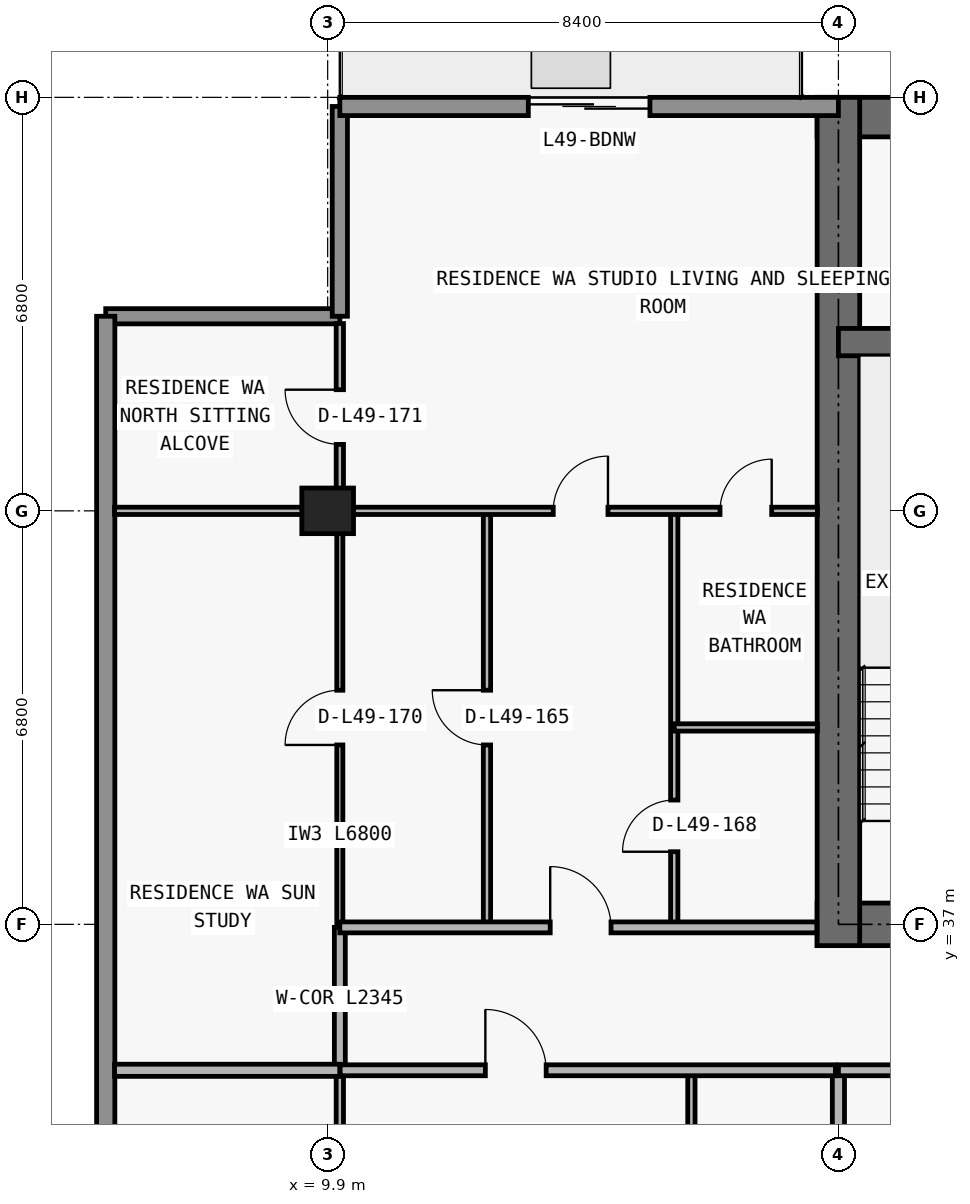
"""IFC4 building model, lengths in metres.
Left out: names, types, materials, properties, quantities, classifications, styles, units other than length and angle.
Written with IfcOpenShell. Run it as: python <this file> out.ifc"""

import sys

from ifc_helpers import new_model, si_unit, direction, frame, frame_2d, origin, origin_2d, place, context, subcontext, project, spatial, rectangle, extrude, element, fill, save


model = new_model("IFC4")
c1 = context("Model", 3, precision=1e-05, world=origin(), true_north=direction((0.0, 1.0)))
c2 = subcontext(c1, "Body", "Model", "MODEL_VIEW")
j1 = project(units=[si_unit("LENGTHUNIT", "METRE"), si_unit("PLANEANGLEUNIT", "RADIAN")], contexts=[c1])
p1 = place(None, origin())
s1 = spatial("IfcSite", under=j1, at=p1, CompositionType="ELEMENT")
p2 = place(p1, origin())
s2 = spatial("IfcBuilding", under=s1, at=p2, CompositionType="ELEMENT")
p3 = place(p2, frame((0.0, 0.0, 177.0)))
s3 = spatial("IfcBuildingStorey", under=s2, at=p3, CompositionType="ELEMENT", Elevation=177.0)
p4 = place(p3, frame((9.9, 43.8, 0.0), z_axis=(0.0, 0.0, 1.0), x_axis=(1.0, 0.0, 0.0)))
e1 = element("IfcColumn", 1, at=p4, inside=s3, PredefinedType="COLUMN", context=c2, shape_type="SweptSolid", body=[
    extrude(rectangle(XDim=0.85, YDim=0.75, at=origin_2d()), origin(), (0.0, 0.0, 1.0), 3.05),
])
p5 = place(p3, frame((17.95, 37.0, 0.0), z_axis=(0.0, 0.0, 1.0), x_axis=(1.0, 0.0, 0.0)))
e2 = element("IfcWall", 2, at=p5, inside=s3, PredefinedType="SHEAR", context=c2, shape_type="SweptSolid", body=[
    extrude(rectangle(XDim=41.9, YDim=0.7, at=frame_2d((20.95, 0.0))), origin(), (0.0, 0.0, 1.0), 3.05),
])
p6 = place(p5, frame((14.35, 0.0, 0.0)))
e3 = element("IfcOpeningElement", 3, at=p6, cuts=e2, PredefinedType="OPENING", context=c2, shape_type="SweptSolid", body=[
    extrude(rectangle(XDim=1.1, YDim=2.15, at=frame_2d((0.55, 1.075))), frame((0.0, 0.36, 0.0), z_axis=(0.0, -1.0, 0.0), x_axis=(1.0, 0.0, 0.0)), (0.0, 0.0, 1.0), 0.72),
])
p7 = place(p5, frame((6.2, 0.0, 0.0)))
e4 = element("IfcOpeningElement", 4, at=p7, cuts=e2, PredefinedType="OPENING", context=c2, shape_type="SweptSolid", body=[
    extrude(rectangle(XDim=1.05, YDim=2.15, at=frame_2d((0.525, 1.075))), frame((0.0, 0.36, 0.0), z_axis=(0.0, -1.0, 0.0), x_axis=(1.0, 0.0, 0.0)), (0.0, 0.0, 1.0), 0.72),
])
p8 = place(p5, frame((34.7, 0.0, 0.0)))
e5 = element("IfcOpeningElement", 5, at=p8, cuts=e2, PredefinedType="OPENING", context=c2, shape_type="SweptSolid", body=[
    extrude(rectangle(XDim=1.05, YDim=2.15, at=frame_2d((0.525, 1.075))), frame((0.0, 0.36, 0.0), z_axis=(0.0, -1.0, 0.0), x_axis=(1.0, 0.0, 0.0)), (0.0, 0.0, 1.0), 0.72),
])
p9 = place(p5, frame((10.812, 0.0, 0.0)))
e6 = element("IfcOpeningElement", 6, at=p9, cuts=e2, PredefinedType="OPENING", context=c2, shape_type="SweptSolid", body=[
    extrude(rectangle(XDim=1.05, YDim=2.15, at=frame_2d((0.525, 1.075))), frame((0.0, 0.36, 0.0), z_axis=(0.0, -1.0, 0.0), x_axis=(1.0, 0.0, 0.0)), (0.0, 0.0, 1.0), 0.72),
])
p10 = place(p5, frame((24.05, 0.0, 0.0)))
e7 = element("IfcOpeningElement", 7, at=p10, cuts=e2, PredefinedType="OPENING", context=c2, shape_type="SweptSolid", body=[
    extrude(rectangle(XDim=1.05, YDim=2.15, at=frame_2d((0.525, 1.075))), frame((0.0, 0.36, 0.0), z_axis=(0.0, -1.0, 0.0), x_axis=(1.0, 0.0, 0.0)), (0.0, 0.0, 1.0), 0.72),
])
p11 = place(p3, frame((17.95, 50.275, 0.0), z_axis=(0.0, 0.0, 1.0), x_axis=(1.0, 0.0, 0.0)))
e8 = element("IfcWall", 8, at=p11, inside=s3, PredefinedType="SHEAR", context=c2, shape_type="SweptSolid", body=[
    extrude(rectangle(XDim=41.9, YDim=0.65, at=frame_2d((20.95, 0.0))), origin(), (0.0, 0.0, 1.0), 3.05),
])
p12 = place(p3, frame((18.3, 36.65, 0.0), z_axis=(0.0, 0.0, 1.0), x_axis=(0.0, 1.0, 0.0)))
e9 = element("IfcWall", 9, at=p12, inside=s3, PredefinedType="SHEAR", context=c2, shape_type="SweptSolid", body=[
    extrude(rectangle(XDim=13.95, YDim=0.7, at=frame_2d((6.975, 0.0))), origin(), (0.0, 0.0, 1.0), 3.05),
])
p13 = place(p3, frame((18.3, 46.575, 0.0), z_axis=(0.0, 0.0, 1.0), x_axis=(1.0, 0.0, 0.0)))
e10 = element("IfcWall", 10, at=p13, inside=s3, PredefinedType="SHEAR", context=c2, shape_type="SweptSolid", body=[
    extrude(rectangle(XDim=41.2, YDim=0.45, at=frame_2d((20.6, 0.0))), origin(), (0.0, 0.0, 1.0), 3.05),
])
p14 = place(p13, frame((7.575, 0.0, 0.0)))
e11 = element("IfcOpeningElement", 11, at=p14, cuts=e10, PredefinedType="OPENING", context=c2, shape_type="SweptSolid", body=[
    extrude(rectangle(XDim=1.05, YDim=2.15, at=frame_2d((0.525, 1.075))), frame((0.0, 0.235, 0.0), z_axis=(0.0, -1.0, 0.0), x_axis=(1.0, 0.0, 0.0)), (0.0, 0.0, 1.0), 0.47),
])
p15 = place(p13, frame((32.625, 0.0, 0.0)))
e12 = element("IfcOpeningElement", 12, at=p15, cuts=e10, PredefinedType="OPENING", context=c2, shape_type="SweptSolid", body=[
    extrude(rectangle(XDim=1.05, YDim=2.15, at=frame_2d((0.525, 1.075))), frame((0.0, 0.235, 0.0), z_axis=(0.0, -1.0, 0.0), x_axis=(1.0, 0.0, 0.0)), (0.0, 0.0, 1.0), 0.47),
])
p16 = place(p3, frame((6.25, 47.0, 0.0), z_axis=(0.0, 0.0, 1.0), x_axis=(1.0, 0.0, 0.0)))
e13 = element("IfcWall", 13, at=p16, inside=s3, PredefinedType="ELEMENTEDWALL", context=c2, shape_type="SweptSolid", body=[
    extrude(rectangle(XDim=3.85, YDim=0.25, at=frame_2d((1.925, 0.0))), origin(), (0.0, 0.0, 1.0), 3.05),
])
p17 = place(p3, frame((10.1, 47.0, 0.0), z_axis=(0.0, 0.0, 1.0), x_axis=(0.0, 1.0, 0.0)))
e14 = element("IfcWall", 14, at=p17, inside=s3, PredefinedType="ELEMENTEDWALL", context=c2, shape_type="SweptSolid", body=[
    extrude(rectangle(XDim=3.45, YDim=0.25, at=frame_2d((1.725, 0.0))), origin(), (0.0, 0.0, 1.0), 3.05),
])
p18 = place(p3, frame((6.25, 29.1, 0.0), z_axis=(0.0, 0.0, 1.0), x_axis=(0.0, 1.0, 0.0)))
e15 = element("IfcWall", 15, at=p18, inside=s3, PredefinedType="STANDARD", context=c2, shape_type="SweptSolid", body=[
    extrude(rectangle(XDim=17.9, YDim=0.3, at=frame_2d((8.95, 0.0))), origin(), (0.0, 0.0, 1.0), 3.05),
])
p19 = place(p3, frame((10.1, 50.45, 0.0), z_axis=(0.0, 0.0, 1.0), x_axis=(1.0, 0.0, 0.0)))
e16 = element("IfcWall", 16, at=p19, inside=s3, PredefinedType="STANDARD", context=c2, shape_type="SweptSolid", body=[
    extrude(rectangle(XDim=8.2, YDim=0.3, at=frame_2d((4.1, 0.0))), origin(), (0.0, 0.0, 1.0), 3.05),
])
p20 = place(p19, frame((3.1, 0.0, 0.0)))
e17 = element("IfcOpeningElement", 17, at=p20, cuts=e16, PredefinedType="OPENING", context=c2, shape_type="SweptSolid", body=[
    extrude(rectangle(XDim=2.0, YDim=2.3, at=frame_2d((1.0, 1.15))), frame((0.0, 0.16, 0.0), z_axis=(0.0, -1.0, 0.0), x_axis=(1.0, 0.0, 0.0)), (0.0, 0.0, 1.0), 0.32),
])
p21 = place(p3, frame((10.1, 30.34, 0.0), z_axis=(0.0, 0.0, 1.0), x_axis=(0.0, 1.0, 0.0)))
e18 = element("IfcWall", 18, at=p21, inside=s3, PredefinedType="PARTITIONING", context=c2, shape_type="SweptSolid", body=[
    extrude(rectangle(XDim=4.26, YDim=0.12, at=frame_2d((2.13, 0.0))), origin(), (0.0, 0.0, 1.0), 2.263),
])
p22 = place(p3, frame((10.1, 34.605, 0.0), z_axis=(0.0, 0.0, 1.0), x_axis=(0.0, 1.0, 0.0)))
e19 = element("IfcWall", 19, at=p22, inside=s3, PredefinedType="PARTITIONING", context=c2, shape_type="SweptSolid", body=[
    extrude(rectangle(XDim=2.345, YDim=0.18, at=frame_2d((1.172, 0.0))), origin(), (0.0, 0.0, 1.0), 2.263),
])
p23 = place(p3, frame((10.1, 37.0, 0.0), z_axis=(0.0, 0.0, 1.0), x_axis=(0.0, 1.0, 0.0)))
e20 = element("IfcWall", 20, at=p23, inside=s3, PredefinedType="MOVABLE", context=c2, shape_type="SweptSolid", body=[
    extrude(rectangle(XDim=6.8, YDim=0.1, at=frame_2d((3.4, 0.0))), origin(), (0.0, 0.0, 1.0), 2.263),
])
p24 = place(p23, frame((2.95, 0.0, 0.0)))
e21 = element("IfcOpeningElement", 21, at=p24, cuts=e20, PredefinedType="OPENING", context=c2, shape_type="SweptSolid", body=[
    extrude(rectangle(XDim=0.9, YDim=2.15, at=frame_2d((0.45, 1.075))), frame((0.0, 0.06, 0.0), z_axis=(0.0, -1.0, 0.0), x_axis=(1.0, 0.0, 0.0)), (0.0, 0.0, 1.0), 0.12),
])
p25 = place(p3, frame((10.1, 43.805, 0.0), z_axis=(0.0, 0.0, 1.0), x_axis=(0.0, 1.0, 0.0)))
e22 = element("IfcWall", 22, at=p25, inside=s3, PredefinedType="PARTITIONING", context=c2, shape_type="SweptSolid", body=[
    extrude(rectangle(XDim=3.075, YDim=0.12, at=frame_2d((1.538, 0.0))), origin(), (0.0, 0.0, 1.0), 3.05),
])
p26 = place(p25, frame((1.087, 0.0, 0.0)))
e23 = element("IfcOpeningElement", 23, at=p26, cuts=e22, PredefinedType="OPENING", context=c2, shape_type="SweptSolid", body=[
    extrude(rectangle(XDim=0.9, YDim=2.15, at=frame_2d((0.45, 1.075))), frame((0.0, 0.07, 0.0), z_axis=(0.0, -1.0, 0.0), x_axis=(1.0, 0.0, 0.0)), (0.0, 0.0, 1.0), 0.14),
])
p27 = place(p3, frame((12.52, 37.0, 0.0), z_axis=(0.0, 0.0, 1.0), x_axis=(0.0, 1.0, 0.0)))
e24 = element("IfcWall", 24, at=p27, inside=s3, PredefinedType="PARTITIONING", context=c2, shape_type="SweptSolid", body=[
    extrude(rectangle(XDim=6.8, YDim=0.12, at=frame_2d((3.4, 0.0))), origin(), (0.0, 0.0, 1.0), 3.05),
])
p28 = place(p27, frame((2.95, 0.0, 0.0)))
e25 = element("IfcOpeningElement", 25, at=p28, cuts=e24, PredefinedType="OPENING", context=c2, shape_type="SweptSolid", body=[
    extrude(rectangle(XDim=0.9, YDim=2.15, at=frame_2d((0.45, 1.075))), frame((0.0, 0.07, 0.0), z_axis=(0.0, -1.0, 0.0), x_axis=(1.0, 0.0, 0.0)), (0.0, 0.0, 1.0), 0.14),
])
p29 = place(p3, frame((15.6, 37.0, 0.0), z_axis=(0.0, 0.0, 1.0), x_axis=(0.0, 1.0, 0.0)))
e26 = element("IfcWall", 26, at=p29, inside=s3, PredefinedType="PARTITIONING", context=c2, shape_type="SweptSolid", body=[
    extrude(rectangle(XDim=6.8, YDim=0.12, at=frame_2d((3.4, 0.0))), origin(), (0.0, 0.0, 1.0), 3.05),
])
p30 = place(p29, frame((1.194, 0.0, 0.0)))
e27 = element("IfcOpeningElement", 27, at=p30, cuts=e26, PredefinedType="OPENING", context=c2, shape_type="SweptSolid", body=[
    extrude(rectangle(XDim=0.85, YDim=2.1, at=frame_2d((0.425, 1.05))), frame((0.0, 0.07, 0.0), z_axis=(0.0, -1.0, 0.0), x_axis=(1.0, 0.0, 0.0)), (0.0, 0.0, 1.0), 0.14),
])
p31 = place(p3, frame((15.882, 30.34, 0.0), z_axis=(0.0, 0.0, 1.0), x_axis=(0.0, 1.0, 0.0)))
e28 = element("IfcWall", 28, at=p31, inside=s3, PredefinedType="PARTITIONING", context=c2, shape_type="SweptSolid", body=[
    extrude(rectangle(XDim=4.26, YDim=0.12, at=frame_2d((2.13, 0.0))), origin(), (0.0, 0.0, 1.0), 3.05),
])
p32 = place(p31, frame((1.705, 0.0, 0.0)))
e29 = element("IfcOpeningElement", 29, at=p32, cuts=e28, PredefinedType="OPENING", context=c2, shape_type="SweptSolid", body=[
    extrude(rectangle(XDim=0.85, YDim=2.1, at=frame_2d((0.425, 1.05))), frame((0.0, 0.07, 0.0), z_axis=(0.0, -1.0, 0.0), x_axis=(1.0, 0.0, 0.0)), (0.0, 0.0, 1.0), 0.14),
])
p33 = place(p3, frame((18.3, 30.34, 0.0), z_axis=(0.0, 0.0, 1.0), x_axis=(0.0, 1.0, 0.0)))
e30 = element("IfcWall", 30, at=p33, inside=s3, PredefinedType="PARTITIONING", context=c2, shape_type="SweptSolid", body=[
    extrude(rectangle(XDim=4.26, YDim=0.2, at=frame_2d((2.13, 0.0))), origin(), (0.0, 0.0, 1.0), 2.263),
])
p34 = place(p3, frame((6.395, 34.6, 0.0), z_axis=(0.0, 0.0, 1.0), x_axis=(1.0, 0.0, 0.0)))
e31 = element("IfcWall", 31, at=p34, inside=s3, PredefinedType="PARTITIONING", context=c2, shape_type="SweptSolid", body=[
    extrude(rectangle(XDim=3.705, YDim=0.2, at=frame_2d((1.853, 0.0))), origin(), (0.0, 0.0, 1.0), 3.05),
])
p35 = place(p3, frame((10.105, 34.6, 0.0), z_axis=(0.0, 0.0, 1.0), x_axis=(1.0, 0.0, 0.0)))
e32 = element("IfcWall", 32, at=p35, inside=s3, PredefinedType="PARTITIONING", context=c2, shape_type="SweptSolid", body=[
    extrude(rectangle(XDim=8.145, YDim=0.18, at=frame_2d((4.073, 0.0))), origin(), (0.0, 0.0, 1.0), 3.05),
])
p36 = place(p35, frame((2.388, 0.0, 0.0)))
e33 = element("IfcOpeningElement", 33, at=p36, cuts=e32, PredefinedType="OPENING", context=c2, shape_type="SweptSolid", body=[
    extrude(rectangle(XDim=1.0, YDim=2.2, at=frame_2d((0.5, 1.1))), frame((0.0, 0.1, 0.0), z_axis=(0.0, -1.0, 0.0), x_axis=(1.0, 0.0, 0.0)), (0.0, 0.0, 1.0), 0.2),
])
p37 = place(p3, frame((18.3, 34.6, 0.0), z_axis=(0.0, 0.0, 1.0), x_axis=(1.0, 0.0, 0.0)))
e34 = element("IfcWall", 34, at=p37, inside=s3, PredefinedType="PARTITIONING", context=c2, shape_type="SweptSolid", body=[
    extrude(rectangle(XDim=41.2, YDim=0.18, at=frame_2d((20.6, 0.0))), origin(), (0.0, 0.0, 1.0), 3.05),
])
p38 = place(p37, frame((2.67, 0.0, 0.0)))
e35 = element("IfcOpeningElement", 35, at=p38, cuts=e34, PredefinedType="OPENING", context=c2, shape_type="SweptSolid", body=[
    extrude(rectangle(XDim=1.0, YDim=2.2, at=frame_2d((0.5, 1.1))), frame((0.0, 0.1, 0.0), z_axis=(0.0, -1.0, 0.0), x_axis=(1.0, 0.0, 0.0)), (0.0, 0.0, 1.0), 0.2),
])
p39 = place(p37, frame((11.212, 0.0, 0.0)))
e36 = element("IfcOpeningElement", 36, at=p39, cuts=e34, PredefinedType="OPENING", context=c2, shape_type="SweptSolid", body=[
    extrude(rectangle(XDim=1.0, YDim=2.2, at=frame_2d((0.5, 1.1))), frame((0.0, 0.1, 0.0), z_axis=(0.0, -1.0, 0.0), x_axis=(1.0, 0.0, 0.0)), (0.0, 0.0, 1.0), 0.2),
])
p40 = place(p37, frame((35.483, 0.0, 0.0)))
e37 = element("IfcOpeningElement", 37, at=p40, cuts=e34, PredefinedType="OPENING", context=c2, shape_type="SweptSolid", body=[
    extrude(rectangle(XDim=1.0, YDim=2.2, at=frame_2d((0.5, 1.1))), frame((0.0, 0.1, 0.0), z_axis=(0.0, -1.0, 0.0), x_axis=(1.0, 0.0, 0.0)), (0.0, 0.0, 1.0), 0.2),
])
p41 = place(p3, frame((10.1, 36.95, 0.0), z_axis=(0.0, 0.0, 1.0), x_axis=(1.0, 0.0, 0.0)))
e38 = element("IfcWall", 38, at=p41, inside=s3, PredefinedType="PARTITIONING", context=c2, shape_type="SweptSolid", body=[
    extrude(rectangle(XDim=7.845, YDim=0.18, at=frame_2d((3.922, 0.0))), origin(), (0.0, 0.0, 1.0), 3.05),
])
p42 = place(p41, frame((3.46, 0.0, 0.0)))
e39 = element("IfcOpeningElement", 39, at=p42, cuts=e38, PredefinedType="OPENING", context=c2, shape_type="SweptSolid", body=[
    extrude(rectangle(XDim=1.0, YDim=2.2, at=frame_2d((0.5, 1.1))), frame((0.0, 0.1, 0.0), z_axis=(0.0, -1.0, 0.0), x_axis=(1.0, 0.0, 0.0)), (0.0, 0.0, 1.0), 0.2),
])
p43 = place(p3, frame((15.6, 40.238, 0.0), z_axis=(0.0, 0.0, 1.0), x_axis=(1.0, 0.0, 0.0)))
e40 = element("IfcWall", 40, at=p43, inside=s3, PredefinedType="PARTITIONING", context=c2, shape_type="SweptSolid", body=[
    extrude(rectangle(XDim=2.355, YDim=0.12, at=frame_2d((1.177, 0.0))), origin(), (0.0, 0.0, 1.0), 3.05),
])
p44 = place(p3, frame((6.395, 43.8, 0.0), z_axis=(0.0, 0.0, 1.0), x_axis=(1.0, 0.0, 0.0)))
e41 = element("IfcWall", 41, at=p44, inside=s3, PredefinedType="PARTITIONING", context=c2, shape_type="SweptSolid", body=[
    extrude(rectangle(XDim=11.56, YDim=0.12, at=frame_2d((5.78, 0.0))), origin(), (0.0, 0.0, 1.0), 2.418),
])
p45 = place(p44, frame((7.215, 0.0, 0.0)))
e42 = element("IfcOpeningElement", 42, at=p45, cuts=e41, PredefinedType="OPENING", context=c2, shape_type="SweptSolid", body=[
    extrude(rectangle(XDim=0.9, YDim=2.15, at=frame_2d((0.45, 1.075))), frame((0.0, 0.07, 0.0), z_axis=(0.0, -1.0, 0.0), x_axis=(1.0, 0.0, 0.0)), (0.0, 0.0, 1.0), 0.14),
])
p46 = place(p44, frame((9.958, 0.0, 0.0)))
e43 = element("IfcOpeningElement", 43, at=p46, cuts=e41, PredefinedType="OPENING", context=c2, shape_type="SweptSolid", body=[
    extrude(rectangle(XDim=0.85, YDim=2.1, at=frame_2d((0.425, 1.05))), frame((0.0, 0.07, 0.0), z_axis=(0.0, -1.0, 0.0), x_axis=(1.0, 0.0, 0.0)), (0.0, 0.0, 1.0), 0.14),
])
p47 = place(p20, origin())
e44 = element("IfcDoor", 44, at=p47, inside=s3, OperationType="DOUBLE_DOOR_SLIDING", PredefinedType="DOOR", context=c2, shape_type="SweptSolid", body=[
    extrude(rectangle(XDim=2.0, YDim=2.3, at=frame_2d((1.0, 1.15))), frame((0.0, 0.025, 0.0), z_axis=(0.0, -1.0, 0.0), x_axis=(1.0, 0.0, 0.0)), (0.0, 0.0, 1.0), 0.05),
])
fill(e17, e44)
p48 = place(p36, origin())
e45 = element("IfcDoor", 45, at=p48, inside=s3, OperationType="SINGLE_SWING_LEFT", PredefinedType="DOOR", context=c2, shape_type="SweptSolid", body=[
    extrude(rectangle(XDim=1.0, YDim=2.2, at=frame_2d((0.5, 1.1))), frame((0.0, 0.025, 0.0), z_axis=(0.0, -1.0, 0.0), x_axis=(1.0, 0.0, 0.0)), (0.0, 0.0, 1.0), 0.05),
])
fill(e33, e45)
p49 = place(p28, origin())
e46 = element("IfcDoor", 46, at=p49, inside=s3, OperationType="SINGLE_SWING_RIGHT", PredefinedType="DOOR", context=c2, shape_type="SweptSolid", body=[
    extrude(rectangle(XDim=0.9, YDim=2.15, at=frame_2d((0.45, 1.075))), frame((0.0, 0.025, 0.0), z_axis=(0.0, -1.0, 0.0), x_axis=(1.0, 0.0, 0.0)), (0.0, 0.0, 1.0), 0.05),
])
fill(e25, e46)
p50 = place(p42, origin())
e47 = element("IfcDoor", 47, at=p50, inside=s3, OperationType="SINGLE_SWING_LEFT", PredefinedType="DOOR", context=c2, shape_type="SweptSolid", body=[
    extrude(rectangle(XDim=1.0, YDim=2.2, at=frame_2d((0.5, 1.1))), frame((0.0, 0.025, 0.0), z_axis=(0.0, -1.0, 0.0), x_axis=(1.0, 0.0, 0.0)), (0.0, 0.0, 1.0), 0.05),
])
fill(e39, e47)
p51 = place(p45, origin())
e48 = element("IfcDoor", 48, at=p51, inside=s3, OperationType="SINGLE_SWING_RIGHT", PredefinedType="DOOR", context=c2, shape_type="SweptSolid", body=[
    extrude(rectangle(XDim=0.9, YDim=2.15, at=frame_2d((0.45, 1.075))), frame((0.0, 0.025, 0.0), z_axis=(0.0, -1.0, 0.0), x_axis=(1.0, 0.0, 0.0)), (0.0, 0.0, 1.0), 0.05),
])
fill(e42, e48)
p52 = place(p30, origin())
e49 = element("IfcDoor", 49, at=p52, inside=s3, OperationType="SINGLE_SWING_LEFT", PredefinedType="DOOR", context=c2, shape_type="SweptSolid", body=[
    extrude(rectangle(XDim=0.85, YDim=2.1, at=frame_2d((0.425, 1.05))), frame((0.0, 0.025, 0.0), z_axis=(0.0, -1.0, 0.0), x_axis=(1.0, 0.0, 0.0)), (0.0, 0.0, 1.0), 0.05),
])
fill(e27, e49)
p53 = place(p46, origin())
e50 = element("IfcDoor", 50, at=p53, inside=s3, OperationType="SINGLE_SWING_RIGHT", PredefinedType="DOOR", context=c2, shape_type="SweptSolid", body=[
    extrude(rectangle(XDim=0.85, YDim=2.1, at=frame_2d((0.425, 1.05))), frame((0.0, 0.025, 0.0), z_axis=(0.0, -1.0, 0.0), x_axis=(1.0, 0.0, 0.0)), (0.0, 0.0, 1.0), 0.05),
])
fill(e43, e50)
p54 = place(p24, origin())
e51 = element("IfcDoor", 51, at=p54, inside=s3, OperationType="SINGLE_SWING_LEFT", PredefinedType="DOOR", context=c2, shape_type="SweptSolid", body=[
    extrude(rectangle(XDim=0.9, YDim=2.15, at=frame_2d((0.45, 1.075))), frame((0.0, 0.025, 0.0), z_axis=(0.0, -1.0, 0.0), x_axis=(1.0, 0.0, 0.0)), (0.0, 0.0, 1.0), 0.05),
])
fill(e21, e51)
p55 = place(p26, origin())
e52 = element("IfcDoor", 52, at=p55, inside=s3, OperationType="SINGLE_SWING_RIGHT", PredefinedType="DOOR", context=c2, shape_type="SweptSolid", body=[
    extrude(rectangle(XDim=0.9, YDim=2.15, at=frame_2d((0.45, 1.075))), frame((0.0, 0.025, 0.0), z_axis=(0.0, -1.0, 0.0), x_axis=(1.0, 0.0, 0.0)), (0.0, 0.0, 1.0), 0.05),
])
fill(e23, e52)
save(model, sys.argv[1])
